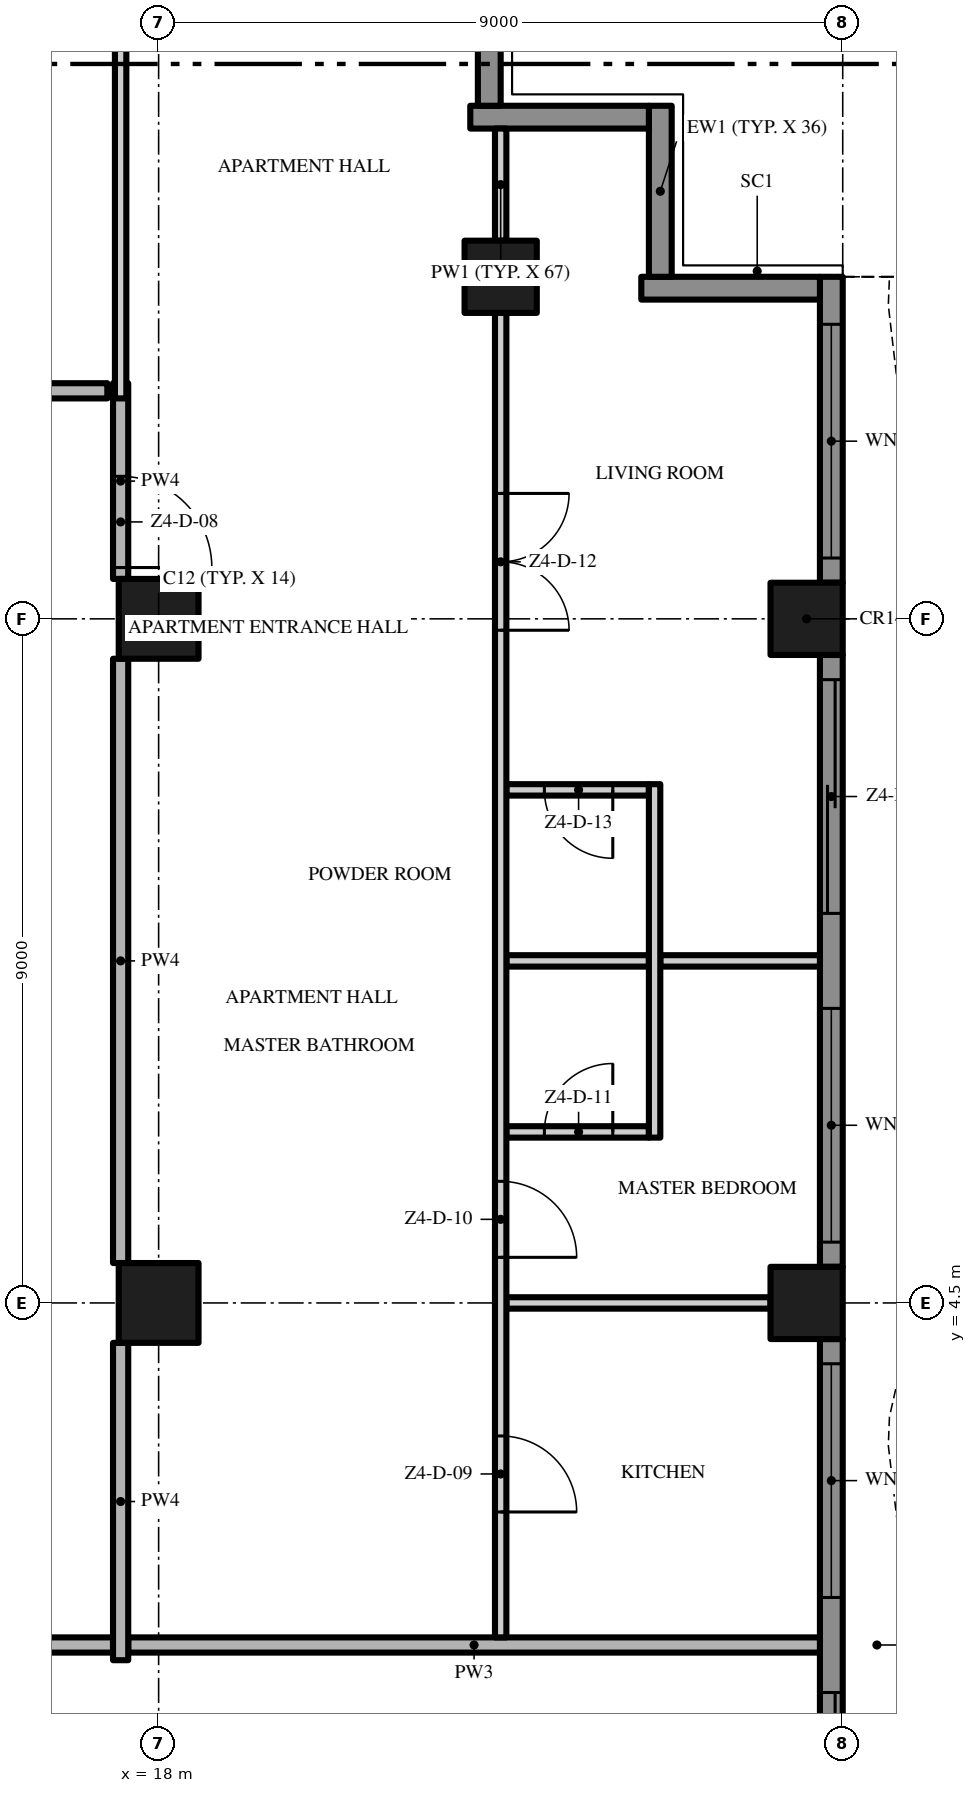
"""IFC4 building model, lengths in metres.
Left out: names, types, materials, properties, quantities, classifications, styles, units other than length and angle.
Written with IfcOpenShell. Run it as: python <this file> out.ifc"""

import sys

from ifc_helpers import new_model, si_unit, direction, frame, frame_2d, origin, origin_2d, place, context, subcontext, project, spatial, polyline, rectangle, outline, extrude, element, fill, save


model = new_model("IFC4")
c1 = context("Model", 3, precision=1e-05, world=origin(), true_north=direction((0.0, 1.0)))
c2 = subcontext(c1, "Body", "Model", "MODEL_VIEW")
j1 = project(units=[si_unit("LENGTHUNIT", "METRE"), si_unit("PLANEANGLEUNIT", "RADIAN")], contexts=[c1])
p1 = place(None, origin())
s1 = spatial("IfcSite", under=j1, at=p1, CompositionType="ELEMENT")
p2 = place(p1, origin())
s2 = spatial("IfcBuilding", under=s1, at=p2, CompositionType="ELEMENT")
p3 = place(p2, frame((0.0, 0.0, 222.4)))
s3 = spatial("IfcBuildingStorey", under=s2, at=p3, CompositionType="ELEMENT", Elevation=222.4)
for number, where, z_axis, x_axis in (
    (1, (18.0, 13.5, 0.0), (0.0, 0.0, 1.0), (1.0, 0.0, 0.0)),
    (2, (18.0, 4.5, 0.0), (0.0, 0.0, 1.0), (1.0, 0.0, 0.0)),
):
    element("IfcColumn", number, at=place(p3, frame(where, z_axis=z_axis, x_axis=x_axis)), inside=s3, PredefinedType="COLUMN", context=c2, shape_type="SweptSolid", body=[
        extrude(rectangle(XDim=1.05, YDim=1.05, at=origin_2d()), origin(), (0.0, 0.0, 1.0), 3.5),
    ])
for number, where, z_axis, x_axis in (
    (3, (26.525, 13.5, 0.0), (0.0, 0.0, 1.0), (1.0, 0.0, 0.0)),
    (4, (22.5, 18.0, 0.0), (0.0, 0.0, 1.0), (1.0, 0.0, 0.0)),
    (5, (26.525, 4.5, 0.0), (0.0, 0.0, 1.0), (1.0, 0.0, 0.0)),
):
    element("IfcColumn", number, at=place(p3, frame(where, z_axis=z_axis, x_axis=x_axis)), inside=s3, PredefinedType="COLUMN", context=c2, shape_type="SweptSolid", body=[
        extrude(rectangle(XDim=0.95, YDim=0.95, at=origin_2d()), origin(), (0.0, 0.0, 1.0), 3.5),
    ])
p4 = place(p3, frame((26.85, 4.025, 0.0), z_axis=(0.0, 0.0, 1.0), x_axis=(0.0, -1.0, 0.0)))
e6 = element("IfcWall", 6, at=p4, inside=s3, PredefinedType="SOLIDWALL", context=c2, shape_type="SweptSolid", body=[
    extrude(rectangle(XDim=8.05, YDim=0.3, at=frame_2d((4.025, 0.0))), origin(), (0.0, 0.0, 1.0), 3.5),
])
p5 = place(p4, frame((4.65, 0.0, 0.0)))
e7 = element("IfcOpeningElement", 7, at=p5, cuts=e6, PredefinedType="OPENING", context=c2, shape_type="SweptSolid", body=[
    extrude(rectangle(XDim=3.075, YDim=2.4, at=frame_2d((1.538, 1.2))), frame((0.0, 0.16, 0.0), z_axis=(0.0, -1.0, 0.0), x_axis=(1.0, 0.0, 0.0)), (0.0, 0.0, 1.0), 0.32),
])
p6 = place(p4, frame((0.325, 0.0, 0.45)))
e8 = element("IfcOpeningElement", 8, at=p6, cuts=e6, PredefinedType="OPENING", context=c2, shape_type="SweptSolid", body=[
    extrude(rectangle(XDim=3.075, YDim=2.65, at=frame_2d((1.538, 1.325))), frame((0.0, 0.16, 0.0), z_axis=(0.0, -1.0, 0.0), x_axis=(1.0, 0.0, 0.0)), (0.0, 0.0, 1.0), 0.32),
])
p7 = place(p3, frame((26.85, 13.025, 0.0), z_axis=(0.0, 0.0, 1.0), x_axis=(0.0, -1.0, 0.0)))
e9 = element("IfcWall", 9, at=p7, inside=s3, PredefinedType="SOLIDWALL", context=c2, shape_type="SweptSolid", body=[
    extrude(rectangle(XDim=8.05, YDim=0.3, at=frame_2d((4.025, 0.0))), origin(), (0.0, 0.0, 1.0), 3.5),
])
p8 = place(p7, frame((4.65, 0.0, 0.45)))
e10 = element("IfcOpeningElement", 10, at=p8, cuts=e9, PredefinedType="OPENING", context=c2, shape_type="SweptSolid", body=[
    extrude(rectangle(XDim=3.075, YDim=2.65, at=frame_2d((1.538, 1.325))), frame((0.0, 0.16, 0.0), z_axis=(0.0, -1.0, 0.0), x_axis=(1.0, 0.0, 0.0)), (0.0, 0.0, 1.0), 0.32),
])
p9 = place(p7, frame((0.325, 0.0, 0.0)))
e11 = element("IfcOpeningElement", 11, at=p9, cuts=e9, PredefinedType="OPENING", context=c2, shape_type="SweptSolid", body=[
    extrude(rectangle(XDim=3.075, YDim=2.4, at=frame_2d((1.538, 1.2))), frame((0.0, 0.16, 0.0), z_axis=(0.0, -1.0, 0.0), x_axis=(1.0, 0.0, 0.0)), (0.0, 0.0, 1.0), 0.32),
])
p10 = place(p3, frame((26.85, 18.0, 0.0), z_axis=(0.0, 0.0, 1.0), x_axis=(0.0, -1.0, 0.0)))
e12 = element("IfcWall", 12, at=p10, inside=s3, PredefinedType="SOLIDWALL", context=c2, shape_type="SweptSolid", body=[
    extrude(rectangle(XDim=4.025, YDim=0.3, at=frame_2d((2.013, 0.0))), origin(), (0.0, 0.0, 1.0), 3.5),
])
p11 = place(p10, frame((0.625, 0.0, 0.45)))
e13 = element("IfcOpeningElement", 13, at=p11, cuts=e12, PredefinedType="OPENING", context=c2, shape_type="SweptSolid", body=[
    extrude(rectangle(XDim=3.075, YDim=2.65, at=frame_2d((1.538, 1.325))), frame((0.0, 0.16, 0.0), z_axis=(0.0, -1.0, 0.0), x_axis=(1.0, 0.0, 0.0)), (0.0, 0.0, 1.0), 0.32),
])
p12 = place(p3, frame((24.35, 17.85, 0.0), z_axis=(0.0, 0.0, 1.0), x_axis=(1.0, 0.0, 0.0)))
e14 = element("IfcWall", 14, at=p12, inside=s3, PredefinedType="SOLIDWALL", context=c2, shape_type="SweptSolid", body=[
    extrude(rectangle(XDim=2.35, YDim=0.3, at=frame_2d((1.175, 0.0))), origin(), (0.0, 0.0, 1.0), 3.5),
])
p13 = place(p3, frame((24.6, 20.25, 0.0), z_axis=(0.0, 0.0, 1.0), x_axis=(0.0, -1.0, 0.0)))
e15 = element("IfcWall", 15, at=p13, inside=s3, PredefinedType="SOLIDWALL", context=c2, shape_type="SweptSolid", body=[
    extrude(rectangle(XDim=2.25, YDim=0.3, at=frame_2d((1.125, 0.0))), origin(), (0.0, 0.0, 1.0), 3.5),
])
p14 = place(p3, frame((22.1, 20.1, 0.0), z_axis=(0.0, 0.0, 1.0), x_axis=(1.0, 0.0, 0.0)))
e16 = element("IfcWall", 16, at=p14, inside=s3, PredefinedType="SOLIDWALL", context=c2, shape_type="SweptSolid", body=[
    extrude(rectangle(XDim=2.35, YDim=0.3, at=frame_2d((1.175, 0.0))), origin(), (0.0, 0.0, 1.0), 3.5),
])
p15 = place(p3, frame((22.35, 22.5, 0.0), z_axis=(0.0, 0.0, 1.0), x_axis=(0.0, -1.0, 0.0)))
e17 = element("IfcWall", 17, at=p15, inside=s3, PredefinedType="SOLIDWALL", context=c2, shape_type="SweptSolid", body=[
    extrude(rectangle(XDim=2.25, YDim=0.3, at=frame_2d((1.125, 0.0))), origin(), (0.0, 0.0, 1.0), 3.5),
])
p16 = place(p3, origin())
e18 = element("IfcWall", 18, at=p16, inside=s3, PredefinedType="USERDEFINED", context=c2, shape_type="SweptSolid", body=[
    extrude(outline(polyline([(29.649, -18.0), (28.988, -16.5), (28.255, -15.0), (27.731, -13.5), (27.6, -12.375), (27.615, -12.0), (27.951, -10.5), (28.612, -9.0), (29.345, -7.5), (29.869, -6.0), (30.0, -4.875), (29.985, -4.5), (29.649, -3.0), (28.988, -1.5), (28.255, 0.0), (27.731, 1.5), (27.6, 2.625), (27.615, 3.0), (27.951, 4.5), (28.612, 6.0), (29.345, 7.5), (29.869, 9.0), (30.0, 10.125), (29.985, 10.5), (29.649, 12.0), (28.988, 13.5), (28.255, 15.0), (27.731, 16.5), (27.6, 17.625), (27.615, 18.0), (27.365, 18.01), (27.349, 17.615), (27.486, 16.444), (28.024, 14.904), (28.761, 13.395), (29.41, 11.921), (29.736, 10.467), (29.749, 10.135), (29.624, 9.056), (29.114, 7.596), (28.385, 6.105), (27.713, 4.579), (27.366, 3.033), (27.349, 2.615), (27.486, 1.444), (28.024, -0.096), (28.761, -1.605), (29.41, -3.079), (29.736, -4.533), (29.749, -4.865), (29.624, -5.944), (29.114, -7.404), (28.385, -8.895), (27.713, -10.421), (27.366, -11.967), (27.349, -12.385), (27.486, -13.556), (28.024, -15.096), (28.761, -16.605), (29.42, -18.101), (29.649, -18.0)])), origin(), (0.0, 0.0, 1.0), 0.9),
])
p17 = place(p3, frame((17.4, 0.0, 0.0), z_axis=(0.0, 0.0, 1.0), x_axis=(-1.0, 0.0, 0.0)))
e19 = element("IfcWall", 19, at=p17, inside=s3, PredefinedType="PARTITIONING", context=c2, shape_type="SweptSolid", body=[
    extrude(rectangle(XDim=17.3, YDim=0.2, at=frame_2d((8.65, 0.0))), origin(), (0.0, 0.0, 1.0), 3.5),
])
p18 = place(p17, frame((7.65, 0.0, 0.0)))
e20 = element("IfcOpeningElement", 20, at=p18, cuts=e19, PredefinedType="OPENING", context=c2, shape_type="SweptSolid", body=[
    extrude(rectangle(XDim=1.5, YDim=2.4, at=frame_2d((0.75, 1.2))), frame((0.0, 0.11, 0.0), z_axis=(0.0, -1.0, 0.0), x_axis=(1.0, 0.0, 0.0)), (0.0, 0.0, 1.0), 0.22),
])
p19 = place(p3, frame((17.6, 0.0, 0.0), z_axis=(0.0, 0.0, 1.0), x_axis=(1.0, 0.0, 0.0)))
e21 = element("IfcWall", 21, at=p19, inside=s3, PredefinedType="PARTITIONING", context=c2, shape_type="SweptSolid", body=[
    extrude(rectangle(XDim=9.1, YDim=0.2, at=frame_2d((4.55, 0.0))), origin(), (0.0, 0.0, 1.0), 3.5),
])
p20 = place(p3, frame((22.575, 4.5, 0.0), z_axis=(0.0, 0.0, 1.0), x_axis=(1.0, 0.0, 0.0)))
e22 = element("IfcWall", 22, at=p20, inside=s3, PredefinedType="PARTITIONING", context=c2, shape_type="SweptSolid", body=[
    extrude(rectangle(XDim=3.475, YDim=0.15, at=frame_2d((1.738, 0.0))), origin(), (0.0, 0.0, 1.0), 3.5),
])
p21 = place(p3, frame((22.575, 6.75, 0.0), z_axis=(0.0, 0.0, 1.0), x_axis=(1.0, 0.0, 0.0)))
e23 = element("IfcWall", 23, at=p21, inside=s3, PredefinedType="PARTITIONING", context=c2, shape_type="SweptSolid", body=[
    extrude(rectangle(XDim=1.875, YDim=0.15, at=frame_2d((0.938, 0.0))), origin(), (0.0, 0.0, 1.0), 3.5),
])
p22 = place(p21, frame((0.5, 0.0, 0.0)))
e24 = element("IfcOpeningElement", 24, at=p22, cuts=e23, PredefinedType="OPENING", context=c2, shape_type="SweptSolid", body=[
    extrude(rectangle(XDim=0.9, YDim=2.1, at=frame_2d((0.45, 1.05))), frame((0.0, 0.085, 0.0), z_axis=(0.0, -1.0, 0.0), x_axis=(1.0, 0.0, 0.0)), (0.0, 0.0, 1.0), 0.17),
])
p23 = place(p3, frame((22.575, 9.0, 0.0), z_axis=(0.0, 0.0, 1.0), x_axis=(1.0, 0.0, 0.0)))
e25 = element("IfcWall", 25, at=p23, inside=s3, PredefinedType="PARTITIONING", context=c2, shape_type="SweptSolid", body=[
    extrude(rectangle(XDim=1.875, YDim=0.15, at=frame_2d((0.938, 0.0))), origin(), (0.0, 0.0, 1.0), 3.5),
])
p24 = place(p3, frame((24.6, 9.0, 0.0), z_axis=(0.0, 0.0, 1.0), x_axis=(1.0, 0.0, 0.0)))
e26 = element("IfcWall", 26, at=p24, inside=s3, PredefinedType="PARTITIONING", context=c2, shape_type="SweptSolid", body=[
    extrude(rectangle(XDim=2.1, YDim=0.15, at=frame_2d((1.05, 0.0))), origin(), (0.0, 0.0, 1.0), 3.5),
])
p25 = place(p3, frame((24.45, 11.25, 0.0), z_axis=(0.0, 0.0, 1.0), x_axis=(-1.0, 0.0, 0.0)))
e27 = element("IfcWall", 27, at=p25, inside=s3, PredefinedType="PARTITIONING", context=c2, shape_type="SweptSolid", body=[
    extrude(rectangle(XDim=1.875, YDim=0.15, at=frame_2d((0.938, 0.0))), origin(), (0.0, 0.0, 1.0), 3.5),
])
p26 = place(p25, frame((0.475, 0.0, 0.0)))
e28 = element("IfcOpeningElement", 28, at=p26, cuts=e27, PredefinedType="OPENING", context=c2, shape_type="SweptSolid", body=[
    extrude(rectangle(XDim=0.9, YDim=2.1, at=frame_2d((0.45, 1.05))), frame((0.0, 0.085, 0.0), z_axis=(0.0, -1.0, 0.0), x_axis=(1.0, 0.0, 0.0)), (0.0, 0.0, 1.0), 0.17),
])
p27 = place(p3, frame((13.5, 16.5, 0.0), z_axis=(0.0, 0.0, 1.0), x_axis=(1.0, 0.0, 0.0)))
e29 = element("IfcWall", 29, at=p27, inside=s3, PredefinedType="PARTITIONING", context=c2, shape_type="SweptSolid", body=[
    extrude(rectangle(XDim=3.825, YDim=0.2, at=frame_2d((1.913, 0.0))), origin(), (0.0, 0.0, 1.0), 3.5),
])
p28 = place(p27, frame((1.55, 0.0, 0.0)))
e30 = element("IfcOpeningElement", 30, at=p28, cuts=e29, PredefinedType="OPENING", context=c2, shape_type="SweptSolid", body=[
    extrude(rectangle(XDim=0.9, YDim=2.1, at=frame_2d((0.45, 1.05))), frame((0.0, 0.11, 0.0), z_axis=(0.0, -1.0, 0.0), x_axis=(1.0, 0.0, 0.0)), (0.0, 0.0, 1.0), 0.22),
])
p29 = place(p3, frame((17.5, -0.2, 0.0), z_axis=(0.0, 0.0, 1.0), x_axis=(0.0, 1.0, 0.0)))
e31 = element("IfcWall", 31, at=p29, inside=s3, PredefinedType="PARTITIONING", context=c2, shape_type="SweptSolid", body=[
    extrude(rectangle(XDim=4.175, YDim=0.2, at=frame_2d((2.087, 0.0))), origin(), (0.0, 0.0, 1.0), 3.5),
])
p30 = place(p3, frame((17.5, 5.025, 0.0), z_axis=(0.0, 0.0, 1.0), x_axis=(0.0, 1.0, 0.0)))
e32 = element("IfcWall", 32, at=p30, inside=s3, PredefinedType="PARTITIONING", context=c2, shape_type="SweptSolid", body=[
    extrude(rectangle(XDim=7.95, YDim=0.2, at=frame_2d((3.975, 0.0))), origin(), (0.0, 0.0, 1.0), 3.5),
])
p31 = place(p3, frame((17.5, 16.6, 0.0), z_axis=(0.0, 0.0, 1.0), x_axis=(0.0, -1.0, 0.0)))
e33 = element("IfcWall", 33, at=p31, inside=s3, PredefinedType="PARTITIONING", context=c2, shape_type="SweptSolid", body=[
    extrude(rectangle(XDim=2.575, YDim=0.2, at=frame_2d((1.288, 0.0))), origin(), (0.0, 0.0, 1.0), 3.5),
])
p32 = place(p31, frame((1.225, 0.0, 0.0)))
e34 = element("IfcOpeningElement", 34, at=p32, cuts=e33, PredefinedType="OPENING", context=c2, shape_type="SweptSolid", body=[
    extrude(rectangle(XDim=1.2, YDim=2.4, at=frame_2d((0.6, 1.2))), frame((0.0, 0.11, 0.0), z_axis=(0.0, -1.0, 0.0), x_axis=(1.0, 0.0, 0.0)), (0.0, 0.0, 1.0), 0.22),
])
p33 = place(p3, frame((17.5, 16.4, 0.0), z_axis=(0.0, 0.0, 1.0), x_axis=(0.0, 1.0, 0.0)))
e35 = element("IfcWall", 35, at=p33, inside=s3, PredefinedType="PARTITIONING", context=c2, shape_type="SweptSolid", body=[
    extrude(rectangle(XDim=5.15, YDim=0.15, at=frame_2d((2.575, 0.0))), origin(), (0.0, 0.0, 1.0), 3.5),
])
p34 = place(p3, frame((22.5, 17.525, 0.0), z_axis=(0.0, 0.0, 1.0), x_axis=(0.0, -1.0, 0.0)))
e36 = element("IfcWall", 36, at=p34, inside=s3, PredefinedType="PARTITIONING", context=c2, shape_type="SweptSolid", body=[
    extrude(rectangle(XDim=17.425, YDim=0.15, at=frame_2d((8.713, 0.0))), origin(), (0.0, 0.0, 1.0), 3.5),
])
p35 = place(p34, frame((14.775, 0.0, 0.0)))
e37 = element("IfcOpeningElement", 37, at=p35, cuts=e36, PredefinedType="OPENING", context=c2, shape_type="SweptSolid", body=[
    extrude(rectangle(XDim=1.0, YDim=2.4, at=frame_2d((0.5, 1.2))), frame((0.0, 0.085, 0.0), z_axis=(0.0, -1.0, 0.0), x_axis=(1.0, 0.0, 0.0)), (0.0, 0.0, 1.0), 0.17),
])
p36 = place(p34, frame((11.425, 0.0, 0.0)))
e38 = element("IfcOpeningElement", 38, at=p36, cuts=e36, PredefinedType="OPENING", context=c2, shape_type="SweptSolid", body=[
    extrude(rectangle(XDim=1.0, YDim=2.4, at=frame_2d((0.5, 1.2))), frame((0.0, 0.085, 0.0), z_axis=(0.0, -1.0, 0.0), x_axis=(1.0, 0.0, 0.0)), (0.0, 0.0, 1.0), 0.17),
])
p37 = place(p34, frame((2.375, 0.0, 0.0)))
e39 = element("IfcOpeningElement", 39, at=p37, cuts=e36, PredefinedType="OPENING", context=c2, shape_type="SweptSolid", body=[
    extrude(rectangle(XDim=1.8, YDim=2.4, at=frame_2d((0.9, 1.2))), frame((0.0, 0.085, 0.0), z_axis=(0.0, -1.0, 0.0), x_axis=(1.0, 0.0, 0.0)), (0.0, 0.0, 1.0), 0.17),
])
p38 = place(p3, frame((22.5, 18.475, 0.0), z_axis=(0.0, 0.0, 1.0), x_axis=(0.0, 1.0, 0.0)))
e40 = element("IfcWall", 40, at=p38, inside=s3, PredefinedType="PARTITIONING", context=c2, shape_type="SweptSolid", body=[
    extrude(rectangle(XDim=1.475, YDim=0.15, at=frame_2d((0.738, 0.0))), origin(), (0.0, 0.0, 1.0), 3.5),
])
p39 = place(p3, frame((24.525, 6.675, 0.0), z_axis=(0.0, 0.0, 1.0), x_axis=(0.0, 1.0, 0.0)))
e41 = element("IfcWall", 41, at=p39, inside=s3, PredefinedType="PARTITIONING", context=c2, shape_type="SweptSolid", body=[
    extrude(rectangle(XDim=4.65, YDim=0.15, at=frame_2d((2.325, 0.0))), origin(), (0.0, 0.0, 1.0), 3.5),
])
p40 = place(p5, origin())
e42 = element("IfcDoor", 42, at=p40, inside=s3, OperationType="SINGLE_SWING_LEFT", PredefinedType="DOOR", context=c2, shape_type="SweptSolid", body=[
    extrude(rectangle(XDim=3.075, YDim=2.4, at=frame_2d((1.538, 1.2))), frame((0.0, 0.025, 0.0), z_axis=(0.0, -1.0, 0.0), x_axis=(1.0, 0.0, 0.0)), (0.0, 0.0, 1.0), 0.05),
])
fill(e7, e42)
p41 = place(p6, origin())
e43 = element("IfcWindow", 43, at=p41, inside=s3, PartitioningType="SINGLE_PANEL", PredefinedType="WINDOW", context=c2, shape_type="SweptSolid", body=[
    extrude(rectangle(XDim=3.075, YDim=2.65, at=frame_2d((1.538, 1.325))), frame((0.0, 0.03, 0.0), z_axis=(0.0, -1.0, 0.0), x_axis=(1.0, 0.0, 0.0)), (0.0, 0.0, 1.0), 0.06),
])
fill(e8, e43)
p42 = place(p8, origin())
e44 = element("IfcWindow", 44, at=p42, inside=s3, PartitioningType="SINGLE_PANEL", PredefinedType="WINDOW", context=c2, shape_type="SweptSolid", body=[
    extrude(rectangle(XDim=3.075, YDim=2.65, at=frame_2d((1.538, 1.325))), frame((0.0, 0.03, 0.0), z_axis=(0.0, -1.0, 0.0), x_axis=(1.0, 0.0, 0.0)), (0.0, 0.0, 1.0), 0.06),
])
fill(e10, e44)
p43 = place(p9, origin())
e45 = element("IfcDoor", 45, at=p43, inside=s3, OperationType="SINGLE_SWING_LEFT", PredefinedType="DOOR", context=c2, shape_type="SweptSolid", body=[
    extrude(rectangle(XDim=3.075, YDim=2.4, at=frame_2d((1.538, 1.2))), frame((0.0, 0.025, 0.0), z_axis=(0.0, -1.0, 0.0), x_axis=(1.0, 0.0, 0.0)), (0.0, 0.0, 1.0), 0.05),
])
fill(e11, e45)
p44 = place(p11, origin())
e46 = element("IfcWindow", 46, at=p44, inside=s3, PartitioningType="SINGLE_PANEL", PredefinedType="WINDOW", context=c2, shape_type="SweptSolid", body=[
    extrude(rectangle(XDim=3.075, YDim=2.65, at=frame_2d((1.538, 1.325))), frame((0.0, 0.03, 0.0), z_axis=(0.0, -1.0, 0.0), x_axis=(1.0, 0.0, 0.0)), (0.0, 0.0, 1.0), 0.06),
])
fill(e13, e46)
p45 = place(p32, origin())
e47 = element("IfcDoor", 47, at=p45, inside=s3, OperationType="SINGLE_SWING_RIGHT", PredefinedType="DOOR", context=c2, shape_type="SweptSolid", body=[
    extrude(rectangle(XDim=1.2, YDim=2.4, at=frame_2d((0.6, 1.2))), frame((0.0, 0.025, 0.0), z_axis=(0.0, -1.0, 0.0), x_axis=(1.0, 0.0, 0.0)), (0.0, 0.0, 1.0), 0.05),
])
fill(e34, e47)
p46 = place(p35, origin())
e48 = element("IfcDoor", 48, at=p46, inside=s3, OperationType="SINGLE_SWING_RIGHT", PredefinedType="DOOR", context=c2, shape_type="SweptSolid", body=[
    extrude(rectangle(XDim=1.0, YDim=2.4, at=frame_2d((0.5, 1.2))), frame((0.0, 0.025, 0.0), z_axis=(0.0, -1.0, 0.0), x_axis=(1.0, 0.0, 0.0)), (0.0, 0.0, 1.0), 0.05),
])
fill(e37, e48)
p47 = place(p36, origin())
e49 = element("IfcDoor", 49, at=p47, inside=s3, OperationType="SINGLE_SWING_RIGHT", PredefinedType="DOOR", context=c2, shape_type="SweptSolid", body=[
    extrude(rectangle(XDim=1.0, YDim=2.4, at=frame_2d((0.5, 1.2))), frame((0.0, 0.025, 0.0), z_axis=(0.0, -1.0, 0.0), x_axis=(1.0, 0.0, 0.0)), (0.0, 0.0, 1.0), 0.05),
])
fill(e38, e49)
p48 = place(p22, origin())
e50 = element("IfcDoor", 50, at=p48, inside=s3, OperationType="SINGLE_SWING_RIGHT", PredefinedType="DOOR", context=c2, shape_type="SweptSolid", body=[
    extrude(rectangle(XDim=0.9, YDim=2.1, at=frame_2d((0.45, 1.05))), frame((0.0, 0.025, 0.0), z_axis=(0.0, -1.0, 0.0), x_axis=(1.0, 0.0, 0.0)), (0.0, 0.0, 1.0), 0.05),
])
fill(e24, e50)
p49 = place(p37, origin())
e51 = element("IfcDoor", 51, at=p49, inside=s3, OperationType="DOUBLE_DOOR_SINGLE_SWING", PredefinedType="DOOR", context=c2, shape_type="SweptSolid", body=[
    extrude(rectangle(XDim=1.8, YDim=2.4, at=frame_2d((0.9, 1.2))), frame((0.0, 0.025, 0.0), z_axis=(0.0, -1.0, 0.0), x_axis=(1.0, 0.0, 0.0)), (0.0, 0.0, 1.0), 0.05),
])
fill(e39, e51)
p50 = place(p26, origin())
e52 = element("IfcDoor", 52, at=p50, inside=s3, OperationType="SINGLE_SWING_LEFT", PredefinedType="DOOR", context=c2, shape_type="SweptSolid", body=[
    extrude(rectangle(XDim=0.9, YDim=2.1, at=frame_2d((0.45, 1.05))), frame((0.0, 0.025, 0.0), z_axis=(0.0, -1.0, 0.0), x_axis=(1.0, 0.0, 0.0)), (0.0, 0.0, 1.0), 0.05),
])
fill(e28, e52)
save(model, sys.argv[1])
